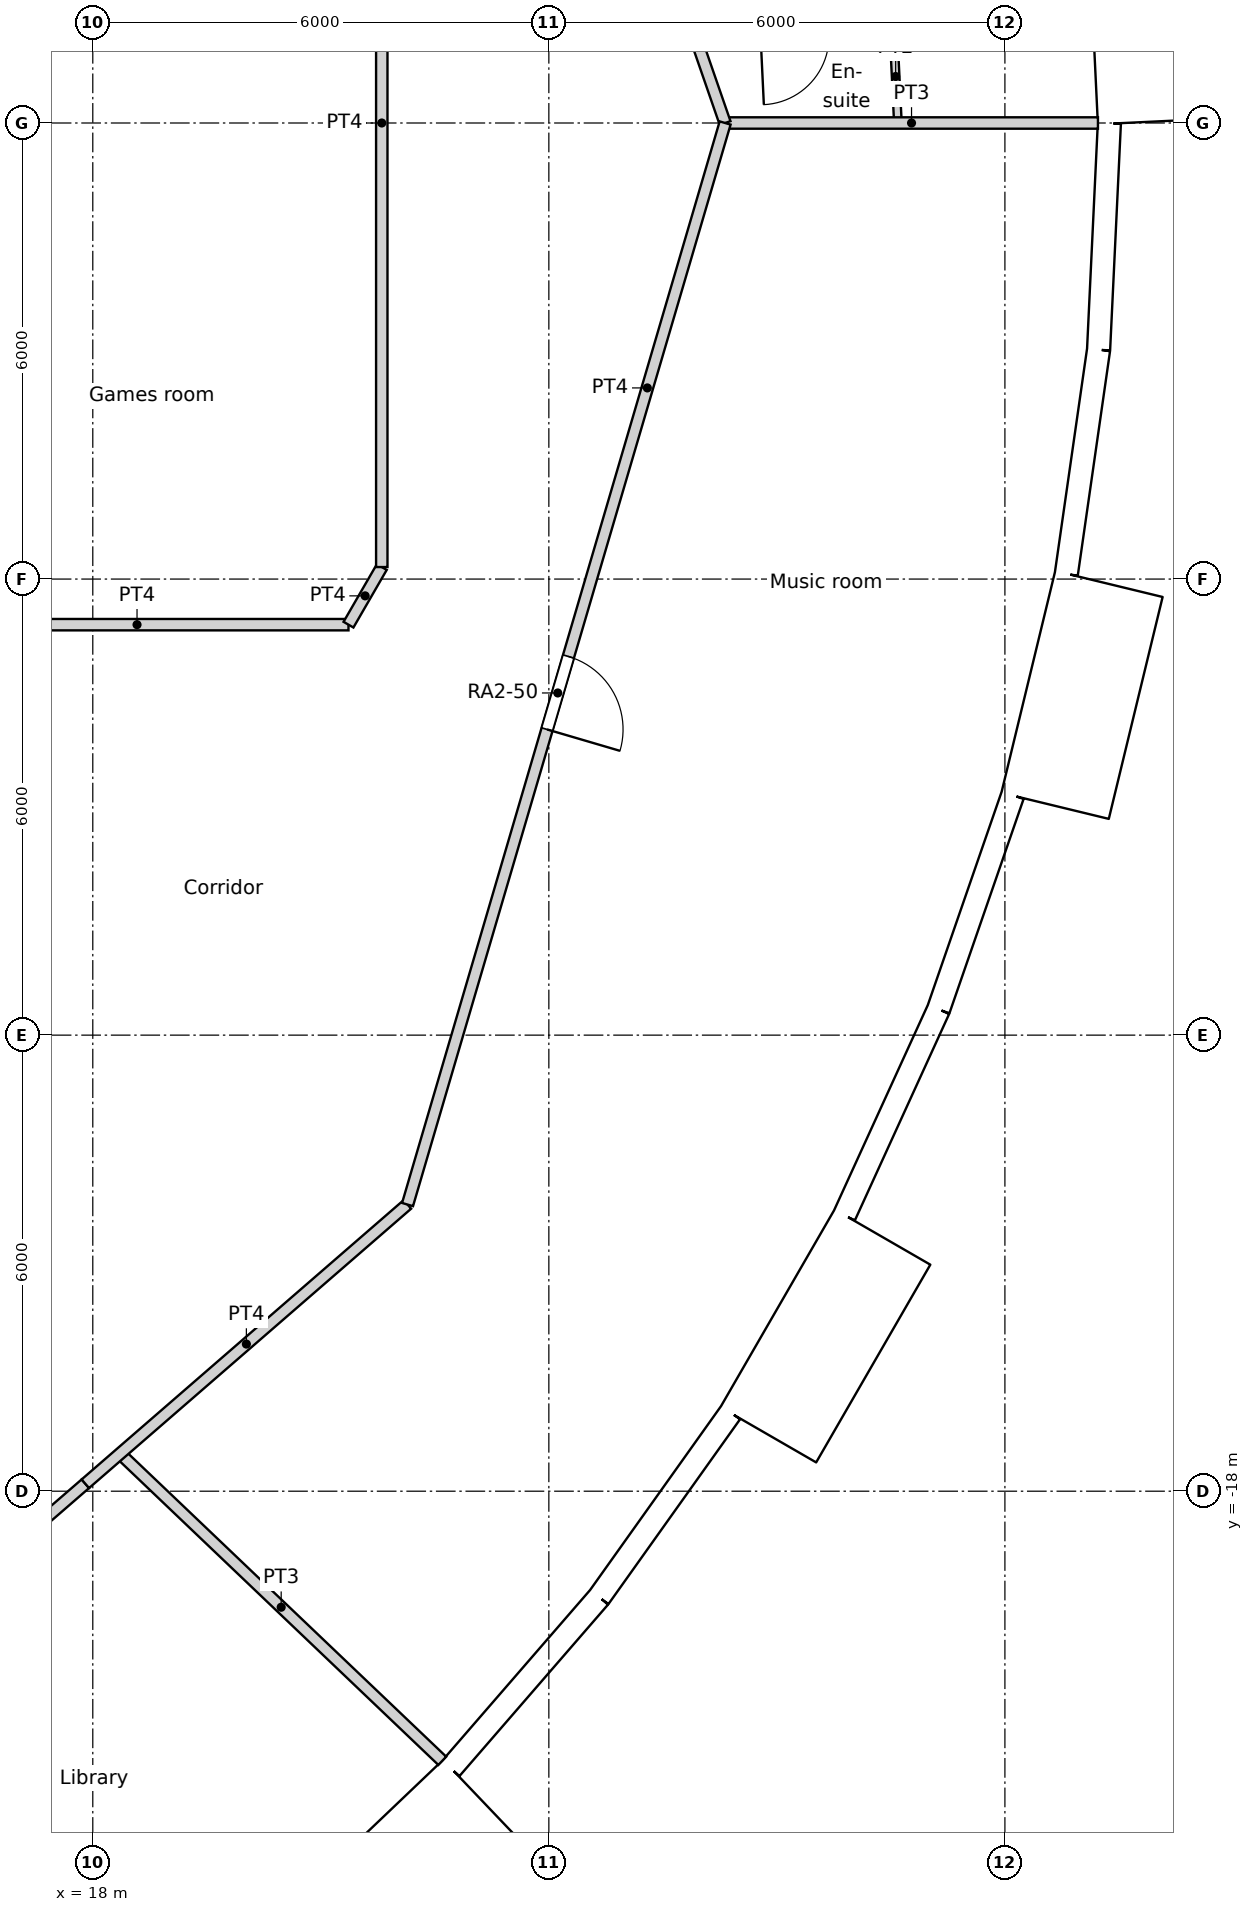
"""IFC4 building model, lengths in metres.
Left out: names, types, materials, properties, quantities, classifications, styles, units other than length and angle.
Written with IfcOpenShell. Run it as: python <this file> out.ifc"""

import sys

from ifc_helpers import new_model, si_unit, direction, frame, frame_2d, origin, origin_2d, place, context, subcontext, project, spatial, rectangle, circle, extrude, element, fill, save


model = new_model("IFC4")
c1 = context("Model", 3, precision=1e-05, world=origin(), true_north=direction((0.0, 1.0)))
c2 = subcontext(c1, "Body", "Model", "MODEL_VIEW")
j1 = project(units=[si_unit("LENGTHUNIT", "METRE"), si_unit("PLANEANGLEUNIT", "RADIAN")], contexts=[c1])
p1 = place(None, origin())
s1 = spatial("IfcSite", under=j1, at=p1, CompositionType="ELEMENT")
p2 = place(p1, origin())
s2 = spatial("IfcBuilding", under=s1, at=p2, CompositionType="ELEMENT")
p3 = place(p2, frame((0.0, 0.0, 39.0)))
s3 = spatial("IfcBuildingStorey", under=s2, at=p3, CompositionType="ELEMENT", Elevation=39.0)
for number, where, z_axis, x_axis in (
    (1, (30.275, 0.0, 0.0), (0.0, 0.0, 1.0), (1.0, 0.0, 0.0)),
    (2, (21.911, -20.892, 0.0), (0.0, 0.0, 1.0), (1.0, 0.0, 0.0)),
    (3, (25.469, -16.368, 0.0), (0.0, 0.0, 1.0), (1.0, 0.0, 0.0)),
    (4, (28.106, -11.252, 0.0), (0.0, 0.0, 1.0), (1.0, 0.0, 0.0)),
    (5, (29.728, -5.729, 0.0), (0.0, 0.0, 1.0), (1.0, 0.0, 0.0)),
):
    element("IfcColumn", number, at=place(p3, frame(where, z_axis=z_axis, x_axis=x_axis)), inside=s3, PredefinedType="COLUMN", context=c2, shape_type="SweptSolid", body=[
        extrude(circle(Radius=0.7, at=origin_2d()), origin(), (0.0, 0.0, 1.0), 3.6),
    ])
for number, where, z_axis, x_axis in (
    (6, (24.548, 0.0, 0.0), (0.0, 0.0, 1.0), (1.0, 0.0, 0.0)),
    (7, (18.805, -15.779, 0.0), (0.0, 0.0, 1.0), (1.0, 0.0, 0.0)),
    (8, (21.937, -11.017, 0.0), (0.0, 0.0, 1.0), (1.0, 0.0, 0.0)),
    (9, (23.886, -5.661, 0.0), (0.0, 0.0, 1.0), (1.0, 0.0, 0.0)),
):
    element("IfcColumn", number, at=place(p3, frame(where, z_axis=z_axis, x_axis=x_axis)), inside=s3, PredefinedType="COLUMN", context=c2, shape_type="SweptSolid", body=[
        extrude(circle(Radius=0.75, at=origin_2d()), origin(), (0.0, 0.0, 1.0), 3.6),
    ])
for number, where, z_axis, x_axis in (
    (10, (18.822, 0.0, 0.0), (0.0, 0.0, 1.0), (1.0, 0.0, 0.0)),
    (11, (17.986, -5.548, 0.0), (0.0, 0.0, 1.0), (1.0, 0.0, 0.0)),
):
    element("IfcColumn", number, at=place(p3, frame(where, z_axis=z_axis, x_axis=x_axis)), inside=s3, PredefinedType="COLUMN", context=c2, shape_type="SweptSolid", body=[
        extrude(circle(Radius=0.8, at=origin_2d()), origin(), (0.0, 0.0, 1.0), 3.6),
    ])
p4 = place(p3, frame((31.949, 0.02, -0.45), z_axis=(0.0, 0.0, 1.0), x_axis=(-0.047607680889, 0.998866111509, 0.0)))
e12 = element("IfcWall", 12, at=p4, inside=s3, PredefinedType="ELEMENTEDWALL", context=c2, shape_type="SweptSolid", body=[
    extrude(rectangle(XDim=3.0, YDim=1.45, at=frame_2d((1.5, 0.0))), origin(), (0.0, 0.0, 1.0), 3.6),
])
p5 = place(p4, frame((1.5, 0.0, 2.0)))
e13 = element("IfcOpeningElement", 13, at=p5, cuts=e12, PredefinedType="OPENING", context=c2, shape_type="SweptSolid", body=[
    extrude(circle(Radius=0.9, at=origin_2d()), frame((0.0, 0.735, 0.0), z_axis=(0.0, -1.0, 0.0), x_axis=(1.0, 0.0, 0.0)), (0.0, 0.0, 1.0), 1.47),
])
p6 = place(p3, frame((20.938, -24.132, -0.45), z_axis=(0.0, 0.0, 1.0), x_axis=(0.723712023899, 0.690102098579, 0.0)))
e14 = element("IfcWall", 14, at=p6, inside=s3, PredefinedType="ELEMENTEDWALL", context=c2, shape_type="SweptSolid", body=[
    extrude(rectangle(XDim=3.0, YDim=1.45, at=frame_2d((1.5, 0.0))), origin(), (0.0, 0.0, 1.0), 3.6),
])
p7 = place(p6, frame((1.5, 0.0, 2.0)))
e15 = element("IfcOpeningElement", 15, at=p7, cuts=e14, PredefinedType="OPENING", context=c2, shape_type="SweptSolid", body=[
    extrude(circle(Radius=0.9, at=origin_2d()), frame((0.0, 0.735, 0.0), z_axis=(0.0, -1.0, 0.0), x_axis=(1.0, 0.0, 0.0)), (0.0, 0.0, 1.0), 1.47),
])
p8 = place(p3, frame((22.711, -21.646, 0.0), z_axis=(0.0, 0.0, 1.0), x_axis=(0.654830712471, 0.755775587066, 0.0)))
e16 = element("IfcWall", 16, at=p8, inside=s3, PredefinedType="SOLIDWALL", context=c2, shape_type="SweptSolid", body=[
    extrude(rectangle(XDim=2.98, YDim=0.3, at=frame_2d((1.49, 0.0))), origin(), (0.0, 0.0, 1.0), 3.15),
])
p9 = place(p8, frame((1.49, 0.0, 1.55)))
e17 = element("IfcOpeningElement", 17, at=p9, cuts=e16, PredefinedType="OPENING", context=c2, shape_type="SweptSolid", body=[
    extrude(circle(Radius=0.9, at=origin_2d()), frame((0.0, 0.16, 0.0), z_axis=(0.0, -1.0, 0.0), x_axis=(1.0, 0.0, 0.0)), (0.0, 0.0, 1.0), 0.32),
])
p10 = place(p3, frame((24.662, -19.394, 0.0), z_axis=(0.0, 0.0, 1.0), x_axis=(0.580113774115, 0.814535456, 0.0)))
e18 = element("IfcWall", 18, at=p10, inside=s3, PredefinedType="SOLIDWALL", context=c2, shape_type="SweptSolid", body=[
    extrude(rectangle(XDim=2.98, YDim=0.3, at=frame_2d((1.49, 0.0))), origin(), (0.0, 0.0, 1.0), 3.15),
])
p11 = place(p10, frame((1.49, 0.0, 1.55)))
e19 = element("IfcOpeningElement", 19, at=p11, cuts=e18, PredefinedType="OPENING", context=c2, shape_type="SweptSolid", body=[
    extrude(circle(Radius=0.9, at=origin_2d()), frame((0.0, 0.16, 0.0), z_axis=(0.0, -1.0, 0.0), x_axis=(1.0, 0.0, 0.0)), (0.0, 0.0, 1.0), 0.32),
])
p12 = place(p3, frame((26.888, -17.256, -0.45), z_axis=(0.0, 0.0, 1.0), x_axis=(0.499990139034, 0.866031096941, 0.0)))
e20 = element("IfcWall", 20, at=p12, inside=s3, PredefinedType="ELEMENTEDWALL", context=c2, shape_type="SweptSolid", body=[
    extrude(rectangle(XDim=3.0, YDim=1.45, at=frame_2d((1.5, 0.0))), origin(), (0.0, 0.0, 1.0), 3.6),
])
p13 = place(p12, frame((1.5, 0.0, 2.0)))
e21 = element("IfcOpeningElement", 21, at=p13, cuts=e20, PredefinedType="OPENING", context=c2, shape_type="SweptSolid", body=[
    extrude(circle(Radius=0.9, at=origin_2d()), frame((0.0, 0.735, 0.0), z_axis=(0.0, -1.0, 0.0), x_axis=(1.0, 0.0, 0.0)), (0.0, 0.0, 1.0), 1.47),
])
p14 = place(p3, frame((27.889, -14.371, 0.0), z_axis=(0.0, 0.0, 1.0), x_axis=(0.415407317162, 0.909635509888, 0.0)))
e22 = element("IfcWall", 22, at=p14, inside=s3, PredefinedType="SOLIDWALL", context=c2, shape_type="SweptSolid", body=[
    extrude(rectangle(XDim=2.98, YDim=0.3, at=frame_2d((1.49, 0.0))), origin(), (0.0, 0.0, 1.0), 3.15),
])
p15 = place(p14, frame((1.49, 0.0, 1.55)))
e23 = element("IfcOpeningElement", 23, at=p15, cuts=e22, PredefinedType="OPENING", context=c2, shape_type="SweptSolid", body=[
    extrude(circle(Radius=0.9, at=origin_2d()), frame((0.0, 0.16, 0.0), z_axis=(0.0, -1.0, 0.0), x_axis=(1.0, 0.0, 0.0)), (0.0, 0.0, 1.0), 0.32),
])
p16 = place(p3, frame((29.127, -11.661, 0.0), z_axis=(0.0, 0.0, 1.0), x_axis=(0.327096492592, 0.944990944154, 0.0)))
e24 = element("IfcWall", 24, at=p16, inside=s3, PredefinedType="SOLIDWALL", context=c2, shape_type="SweptSolid", body=[
    extrude(rectangle(XDim=2.979, YDim=0.3, at=frame_2d((1.49, 0.0))), origin(), (0.0, 0.0, 1.0), 3.15),
])
p17 = place(p16, frame((1.49, 0.0, 1.55)))
e25 = element("IfcOpeningElement", 25, at=p17, cuts=e24, PredefinedType="OPENING", context=c2, shape_type="SweptSolid", body=[
    extrude(circle(Radius=0.9, at=origin_2d()), frame((0.0, 0.16, 0.0), z_axis=(0.0, -1.0, 0.0), x_axis=(1.0, 0.0, 0.0)), (0.0, 0.0, 1.0), 0.32),
])
p18 = place(p3, frame((30.661, -8.982, -0.45), z_axis=(0.0, 0.0, 1.0), x_axis=(0.235751415068, 0.971813392732, 0.0)))
e26 = element("IfcWall", 26, at=p18, inside=s3, PredefinedType="ELEMENTEDWALL", context=c2, shape_type="SweptSolid", body=[
    extrude(rectangle(XDim=3.0, YDim=1.45, at=frame_2d((1.5, 0.0))), origin(), (0.0, 0.0, 1.0), 3.6),
])
p19 = place(p18, frame((1.5, 0.0, 2.0)))
e27 = element("IfcOpeningElement", 27, at=p19, cuts=e26, PredefinedType="OPENING", context=c2, shape_type="SweptSolid", body=[
    extrude(circle(Radius=0.9, at=origin_2d()), frame((0.0, 0.735, 0.0), z_axis=(0.0, -1.0, 0.0), x_axis=(1.0, 0.0, 0.0)), (0.0, 0.0, 1.0), 1.47),
])
p20 = place(p3, frame((30.808, -5.932, 0.0), z_axis=(0.0, 0.0, 1.0), x_axis=(0.142327539111, 0.989819615693, 0.0)))
e28 = element("IfcWall", 28, at=p20, inside=s3, PredefinedType="SOLIDWALL", context=c2, shape_type="SweptSolid", body=[
    extrude(rectangle(XDim=2.979, YDim=0.3, at=frame_2d((1.49, 0.0))), origin(), (0.0, 0.0, 1.0), 3.15),
])
p21 = place(p20, frame((1.49, 0.0, 1.55)))
e29 = element("IfcOpeningElement", 29, at=p21, cuts=e28, PredefinedType="OPENING", context=c2, shape_type="SweptSolid", body=[
    extrude(circle(Radius=0.9, at=origin_2d()), frame((0.0, 0.16, 0.0), z_axis=(0.0, -1.0, 0.0), x_axis=(1.0, 0.0, 0.0)), (0.0, 0.0, 1.0), 0.32),
])
p22 = place(p3, frame((31.232, -2.982, 0.0), z_axis=(0.0, 0.0, 1.0), x_axis=(0.047522328113, 0.998870175914, 0.0)))
e30 = element("IfcWall", 30, at=p22, inside=s3, PredefinedType="SOLIDWALL", context=c2, shape_type="SweptSolid", body=[
    extrude(rectangle(XDim=2.98, YDim=0.3, at=frame_2d((1.49, 0.0))), origin(), (0.0, 0.0, 1.0), 3.15),
])
p23 = place(p22, frame((1.49, 0.0, 1.55)))
e31 = element("IfcOpeningElement", 31, at=p23, cuts=e30, PredefinedType="OPENING", context=c2, shape_type="SweptSolid", body=[
    extrude(circle(Radius=0.9, at=origin_2d()), frame((0.0, 0.16, 0.0), z_axis=(0.0, -1.0, 0.0), x_axis=(1.0, 0.0, 0.0)), (0.0, 0.0, 1.0), 0.32),
])
p24 = place(p3, frame((15.8, -6.6, 0.0), z_axis=(0.0, 0.0, 1.0), x_axis=(1.0, 0.0, 0.0)))
e32 = element("IfcWall", 32, at=p24, inside=s3, PredefinedType="PARTITIONING", context=c2, shape_type="SweptSolid", body=[
    extrude(rectangle(XDim=5.564, YDim=0.15, at=frame_2d((2.782, 0.0))), origin(), (0.0, 0.0, 1.0), 3.15),
])
p25 = place(p3, frame((21.364, -6.6, 0.0), z_axis=(0.0, 0.0, 1.0), x_axis=(0.500277597875, 0.865865073245, 0.0)))
e33 = element("IfcWall", 33, at=p25, inside=s3, PredefinedType="PARTITIONING", context=c2, shape_type="SweptSolid", body=[
    extrude(rectangle(XDim=0.875, YDim=0.15, at=frame_2d((0.438, 0.0))), origin(), (0.0, 0.0, 1.0), 3.15),
])
p26 = place(p3, frame((21.802, -5.842, 0.0), z_axis=(0.0, 0.0, 1.0), x_axis=(0.0, 1.0, 0.0)))
e34 = element("IfcWall", 34, at=p26, inside=s3, PredefinedType="PARTITIONING", context=c2, shape_type="SweptSolid", body=[
    extrude(rectangle(XDim=11.684, YDim=0.15, at=frame_2d((5.842, 0.0))), origin(), (0.0, 0.0, 1.0), 3.15),
])
p27 = place(p3, frame((20.689, 16.269, 0.0), z_axis=(0.0, 0.0, 1.0), x_axis=(0.327000485361, -0.945024170365, 0.0)))
e35 = element("IfcWall", 35, at=p27, inside=s3, PredefinedType="PARTITIONING", context=c2, shape_type="SweptSolid", body=[
    extrude(rectangle(XDim=17.216, YDim=0.15, at=frame_2d((8.608, 0.0))), origin(), (0.0, 0.0, 1.0), 3.15),
])
p28 = place(p27, frame((12.47, 0.0, 0.0)))
e36 = element("IfcOpeningElement", 36, at=p28, cuts=e35, PredefinedType="OPENING", context=c2, shape_type="SweptSolid", body=[
    extrude(rectangle(XDim=1.1, YDim=2.1, at=frame_2d((0.55, 1.05))), frame((0.0, 0.075, 0.0), z_axis=(0.0, -1.0, 0.0), x_axis=(1.0, 0.0, 0.0)), (0.0, 0.0, 1.0), 0.15),
])
p29 = place(p27, frame((1.148, 0.0, 0.0)))
e37 = element("IfcOpeningElement", 37, at=p29, cuts=e35, PredefinedType="OPENING", context=c2, shape_type="SweptSolid", body=[
    extrude(rectangle(XDim=1.1, YDim=2.1, at=frame_2d((0.55, 1.05))), frame((0.0, 0.075, 0.0), z_axis=(0.0, -1.0, 0.0), x_axis=(1.0, 0.0, 0.0)), (0.0, 0.0, 1.0), 0.15),
])
p30 = place(p3, frame((17.902, -17.902, 0.0), z_axis=(0.0, 0.0, 1.0), x_axis=(0.755408961329, 0.655253615895, 0.0)))
e38 = element("IfcWall", 38, at=p30, inside=s3, PredefinedType="PARTITIONING", context=c2, shape_type="SweptSolid", body=[
    extrude(rectangle(XDim=5.609, YDim=0.15, at=frame_2d((2.804, 0.0))), origin(), (0.0, 0.0, 1.0), 3.15),
])
p31 = place(p3, frame((22.141, -14.229, 0.0), z_axis=(0.0, 0.0, 1.0), x_axis=(0.281730446162, 0.959493593363, 0.0)))
e39 = element("IfcWall", 39, at=p31, inside=s3, PredefinedType="PARTITIONING", context=c2, shape_type="SweptSolid", body=[
    extrude(rectangle(XDim=14.83, YDim=0.15, at=frame_2d((7.415, 0.0))), origin(), (0.0, 0.0, 1.0), 3.15),
])
p32 = place(p31, frame((6.515, 0.0, 0.0)))
e40 = element("IfcOpeningElement", 40, at=p32, cuts=e39, PredefinedType="OPENING", context=c2, shape_type="SweptSolid", body=[
    extrude(rectangle(XDim=1.0, YDim=2.04, at=frame_2d((0.5, 1.02))), frame((0.0, 0.075, 0.0), z_axis=(0.0, -1.0, 0.0), x_axis=(1.0, 0.0, 0.0)), (0.0, 0.0, 1.0), 0.15),
])
p33 = place(p3, frame((10.933, -23.94, 0.0), z_axis=(0.0, 0.0, 1.0), x_axis=(0.755793907002, 0.654809567843, 0.0)))
e41 = element("IfcWall", 41, at=p33, inside=s3, PredefinedType="PARTITIONING", context=c2, shape_type="SweptSolid", body=[
    extrude(rectangle(XDim=9.221, YDim=0.15, at=frame_2d((4.61, 0.0))), origin(), (0.0, 0.0, 1.0), 3.15),
])
p34 = place(p3, frame((28.533, 1.223, 0.0), z_axis=(0.0, 0.0, 1.0), x_axis=(0.048256750126, -0.99883496438, 0.0)))
e42 = element("IfcWall", 42, at=p34, inside=s3, PredefinedType="PARTITIONING", context=c2, shape_type="SweptSolid", body=[
    extrude(rectangle(XDim=1.224, YDim=0.1, at=frame_2d((0.612, 0.0))), origin(), (0.0, 0.0, 1.0), 3.15),
])
p35 = place(p3, frame((26.319, 0.0, 0.0), z_axis=(0.0, 0.0, 1.0), x_axis=(1.0, 0.0, 0.0)))
e43 = element("IfcWall", 43, at=p35, inside=s3, PredefinedType="PARTITIONING", context=c2, shape_type="SweptSolid", body=[
    extrude(rectangle(XDim=4.905, YDim=0.15, at=frame_2d((2.453, 0.0))), origin(), (0.0, 0.0, 1.0), 3.15),
])
p36 = place(p3, frame((18.359, -17.506, 0.0), z_axis=(0.0, 0.0, 1.0), x_axis=(0.723808715798, -0.690000683286, 0.0)))
e44 = element("IfcWall", 44, at=p36, inside=s3, PredefinedType="PARTITIONING", context=c2, shape_type="SweptSolid", body=[
    extrude(rectangle(XDim=5.856, YDim=0.15, at=frame_2d((2.928, 0.0))), origin(), (0.0, 0.0, 1.0), 3.15),
])
p37 = place(p5, origin())
e45 = element("IfcWindow", 45, at=p37, inside=s3, PartitioningType="SINGLE_PANEL", PredefinedType="WINDOW", context=c2, shape_type="SweptSolid", body=[
    extrude(circle(Radius=0.9, at=origin_2d()), frame((0.0, 0.695, 0.0), z_axis=(0.0, -1.0, 0.0), x_axis=(1.0, 0.0, 0.0)), (0.0, 0.0, 1.0), 0.1),
])
fill(e13, e45)
p38 = place(p7, origin())
e46 = element("IfcWindow", 46, at=p38, inside=s3, PartitioningType="SINGLE_PANEL", PredefinedType="WINDOW", context=c2, shape_type="SweptSolid", body=[
    extrude(circle(Radius=0.9, at=origin_2d()), frame((0.0, 0.695, 0.0), z_axis=(0.0, -1.0, 0.0), x_axis=(1.0, 0.0, 0.0)), (0.0, 0.0, 1.0), 0.1),
])
fill(e15, e46)
p39 = place(p9, origin())
e47 = element("IfcWindow", 47, at=p39, inside=s3, PartitioningType="SINGLE_PANEL", PredefinedType="WINDOW", context=c2, shape_type="SweptSolid", body=[
    extrude(circle(Radius=0.9, at=origin_2d()), frame((0.0, 0.12, 0.0), z_axis=(0.0, -1.0, 0.0), x_axis=(1.0, 0.0, 0.0)), (0.0, 0.0, 1.0), 0.1),
])
fill(e17, e47)
p40 = place(p11, origin())
e48 = element("IfcWindow", 48, at=p40, inside=s3, PartitioningType="SINGLE_PANEL", PredefinedType="WINDOW", context=c2, shape_type="SweptSolid", body=[
    extrude(circle(Radius=0.9, at=origin_2d()), frame((0.0, 0.12, 0.0), z_axis=(0.0, -1.0, 0.0), x_axis=(1.0, 0.0, 0.0)), (0.0, 0.0, 1.0), 0.1),
])
fill(e19, e48)
p41 = place(p13, origin())
e49 = element("IfcWindow", 49, at=p41, inside=s3, PartitioningType="SINGLE_PANEL", PredefinedType="WINDOW", context=c2, shape_type="SweptSolid", body=[
    extrude(circle(Radius=0.9, at=origin_2d()), frame((0.0, 0.695, 0.0), z_axis=(0.0, -1.0, 0.0), x_axis=(1.0, 0.0, 0.0)), (0.0, 0.0, 1.0), 0.1),
])
fill(e21, e49)
p42 = place(p15, origin())
e50 = element("IfcWindow", 50, at=p42, inside=s3, PartitioningType="SINGLE_PANEL", PredefinedType="WINDOW", context=c2, shape_type="SweptSolid", body=[
    extrude(circle(Radius=0.9, at=origin_2d()), frame((0.0, 0.12, 0.0), z_axis=(0.0, -1.0, 0.0), x_axis=(1.0, 0.0, 0.0)), (0.0, 0.0, 1.0), 0.1),
])
fill(e23, e50)
p43 = place(p17, origin())
e51 = element("IfcWindow", 51, at=p43, inside=s3, PartitioningType="SINGLE_PANEL", PredefinedType="WINDOW", context=c2, shape_type="SweptSolid", body=[
    extrude(circle(Radius=0.9, at=origin_2d()), frame((0.0, 0.12, 0.0), z_axis=(0.0, -1.0, 0.0), x_axis=(1.0, 0.0, 0.0)), (0.0, 0.0, 1.0), 0.1),
])
fill(e25, e51)
p44 = place(p19, origin())
e52 = element("IfcWindow", 52, at=p44, inside=s3, PartitioningType="SINGLE_PANEL", PredefinedType="WINDOW", context=c2, shape_type="SweptSolid", body=[
    extrude(circle(Radius=0.9, at=origin_2d()), frame((0.0, 0.695, 0.0), z_axis=(0.0, -1.0, 0.0), x_axis=(1.0, 0.0, 0.0)), (0.0, 0.0, 1.0), 0.1),
])
fill(e27, e52)
p45 = place(p21, origin())
e53 = element("IfcWindow", 53, at=p45, inside=s3, PartitioningType="SINGLE_PANEL", PredefinedType="WINDOW", context=c2, shape_type="SweptSolid", body=[
    extrude(circle(Radius=0.9, at=origin_2d()), frame((0.0, 0.12, 0.0), z_axis=(0.0, -1.0, 0.0), x_axis=(1.0, 0.0, 0.0)), (0.0, 0.0, 1.0), 0.1),
])
fill(e29, e53)
p46 = place(p23, origin())
e54 = element("IfcWindow", 54, at=p46, inside=s3, PartitioningType="SINGLE_PANEL", PredefinedType="WINDOW", context=c2, shape_type="SweptSolid", body=[
    extrude(circle(Radius=0.9, at=origin_2d()), frame((0.0, 0.12, 0.0), z_axis=(0.0, -1.0, 0.0), x_axis=(1.0, 0.0, 0.0)), (0.0, 0.0, 1.0), 0.1),
])
fill(e31, e54)
p47 = place(p32, origin())
e55 = element("IfcDoor", 55, at=p47, inside=s3, OperationType="SINGLE_SWING_RIGHT", PredefinedType="DOOR", context=c2, shape_type="SweptSolid", body=[
    extrude(rectangle(XDim=1.0, YDim=2.04, at=frame_2d((0.5, 1.02))), frame((0.0, 0.025, 0.0), z_axis=(0.0, -1.0, 0.0), x_axis=(1.0, 0.0, 0.0)), (0.0, 0.0, 1.0), 0.05),
])
fill(e40, e55)
save(model, sys.argv[1])
